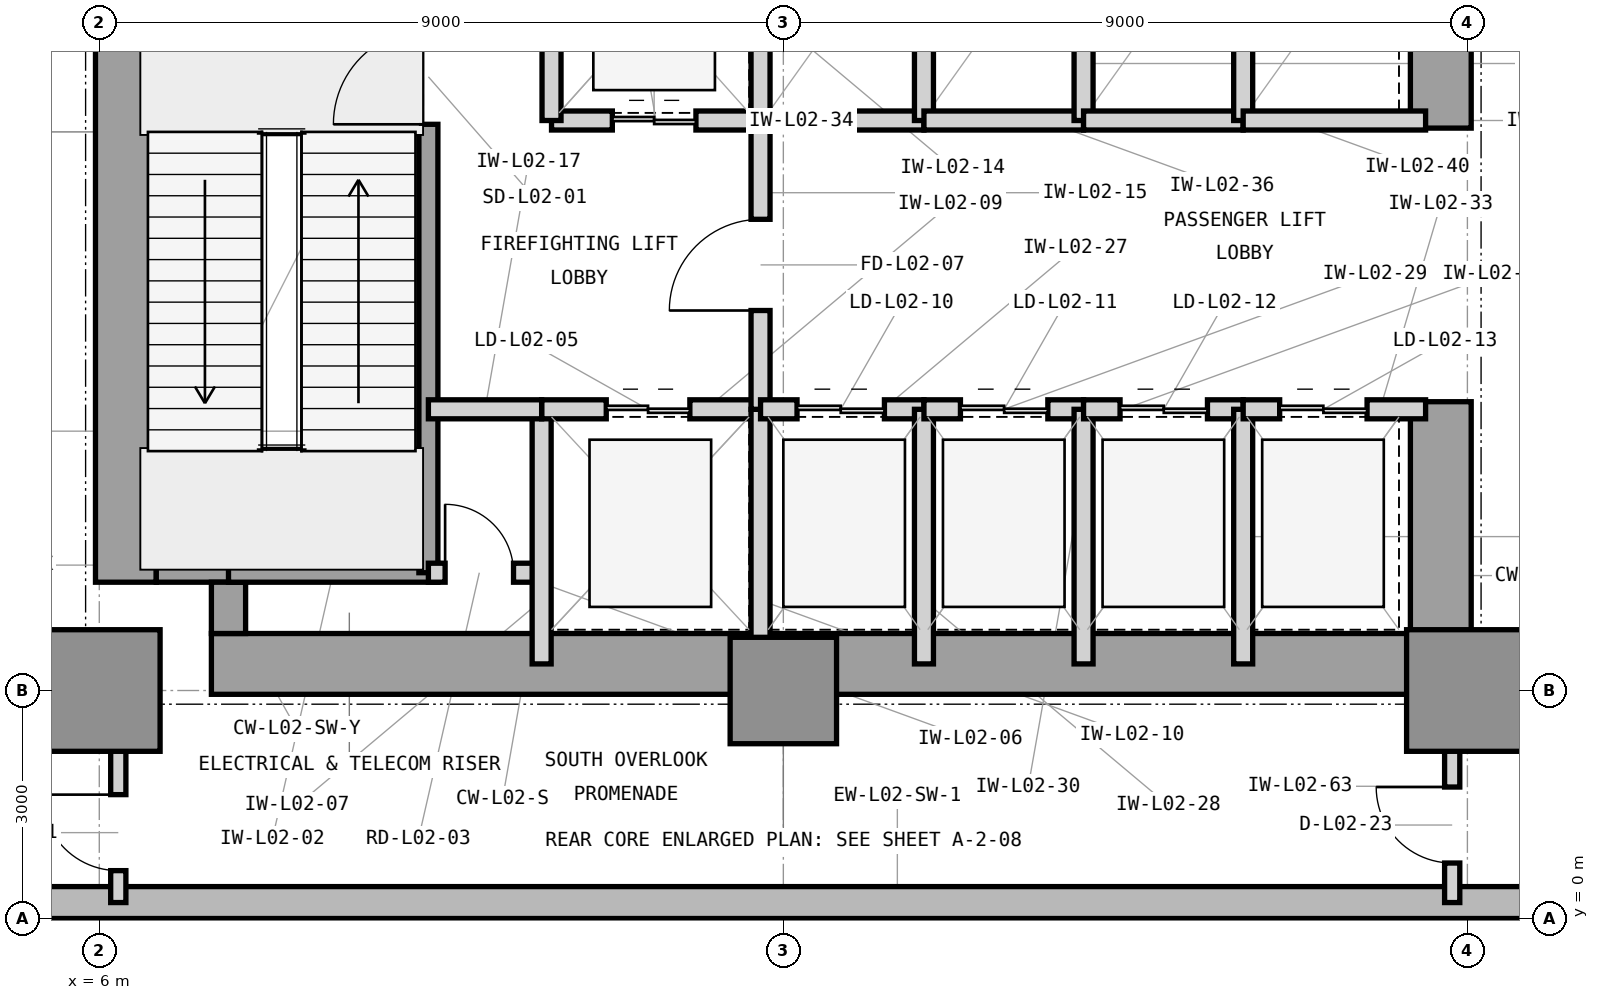
"""IFC4 building model, lengths in metres.
Left out: names, types, materials, properties, quantities, classifications, styles, units other than length and angle.
Written with IfcOpenShell. Run it as: python <this file> out.ifc"""

import sys

from ifc_helpers import new_model, si_unit, direction, frame, frame_2d, origin, origin_2d, place, context, subcontext, project, spatial, rectangle, extrude, element, fill, save


model = new_model("IFC4")
c1 = context("Model", 3, precision=1e-05, world=origin(), true_north=direction((0.0, 1.0)))
c2 = subcontext(c1, "Body", "Model", "MODEL_VIEW")
j1 = project(units=[si_unit("LENGTHUNIT", "METRE"), si_unit("PLANEANGLEUNIT", "RADIAN")], contexts=[c1])
p1 = place(None, origin())
s1 = spatial("IfcSite", under=j1, at=p1, CompositionType="ELEMENT")
p2 = place(p1, origin())
s2 = spatial("IfcBuilding", under=s1, at=p2, CompositionType="ELEMENT")
p3 = place(p2, frame((0.0, 0.0, 10.8)))
s3 = spatial("IfcBuildingStorey", under=s2, at=p3, CompositionType="ELEMENT", Elevation=10.8)
p4 = place(p3, frame((7.475, 3.35, 0.0), z_axis=(0.0, 0.0, 1.0), x_axis=(1.0, 0.0, 0.0)))
e1 = element("IfcWall", 1, at=p4, inside=s3, PredefinedType="SHEAR", context=c2, shape_type="SweptSolid", body=[
    extrude(rectangle(XDim=16.575, YDim=0.8, at=frame_2d((8.288, 0.0))), origin(), (0.0, 0.0, 1.0), 5.4),
])
p5 = place(p3, frame((6.35, 4.425, 0.0), z_axis=(0.0, 0.0, 1.0), x_axis=(0.0, 1.0, 0.0)))
e2 = element("IfcWall", 2, at=p5, inside=s3, PredefinedType="SHEAR", context=c2, shape_type="SweptSolid", body=[
    extrude(rectangle(XDim=15.15, YDim=0.8, at=frame_2d((7.575, 0.0))), origin(), (0.0, 0.0, 1.0), 5.4),
])
p6 = place(p3, frame((23.65, 3.75, 0.0), z_axis=(0.0, 0.0, 1.0), x_axis=(0.0, 1.0, 0.0)))
e3 = element("IfcWall", 3, at=p6, inside=s3, PredefinedType="SHEAR", context=c2, shape_type="SweptSolid", body=[
    extrude(rectangle(XDim=3.05, YDim=0.8, at=frame_2d((1.525, 0.0))), origin(), (0.0, 0.0, 1.0), 5.4),
])
p7 = place(p3, frame((23.65, 10.4, 0.0), z_axis=(0.0, 0.0, 1.0), x_axis=(0.0, 1.0, 0.0)))
e4 = element("IfcWall", 4, at=p7, inside=s3, PredefinedType="SHEAR", context=c2, shape_type="SweptSolid", body=[
    extrude(rectangle(XDim=3.2, YDim=0.8, at=frame_2d((1.6, 0.0))), origin(), (0.0, 0.0, 1.0), 5.4),
])
p8 = place(p3, frame((6.75, 4.65, 0.0), z_axis=(0.0, 0.0, 1.0), x_axis=(1.0, 0.0, 0.0)))
e5 = element("IfcWall", 5, at=p8, inside=s3, PredefinedType="SHEAR", context=c2, shape_type="SweptSolid", body=[
    extrude(rectangle(XDim=1.175, YDim=0.45, at=frame_2d((0.587, 0.0))), origin(), (0.0, 0.0, 1.0), 5.4),
])
p9 = place(p3, frame((7.7, 3.75, 0.0), z_axis=(0.0, 0.0, 1.0), x_axis=(0.0, 1.0, 0.0)))
e6 = element("IfcWall", 6, at=p9, inside=s3, PredefinedType="SHEAR", context=c2, shape_type="SweptSolid", body=[
    extrude(rectangle(XDim=0.675, YDim=0.45, at=frame_2d((0.337, 0.0))), origin(), (0.0, 0.0, 1.0), 5.4),
])
p10 = place(p3, frame((6.0, 3.0, 0.0), z_axis=(0.0, 0.0, 1.0), x_axis=(1.0, 0.0, 0.0)))
e7 = element("IfcColumn", 7, at=p10, inside=s3, PredefinedType="COLUMN", context=c2, shape_type="SweptSolid", body=[
    extrude(rectangle(XDim=1.6, YDim=1.6, at=origin_2d()), origin(), (0.0, 0.0, 1.0), 4.8),
])
p11 = place(p3, frame((15.0, 3.0, 0.0), z_axis=(0.0, 0.0, 1.0), x_axis=(1.0, 0.0, 0.0)))
e8 = element("IfcColumn", 8, at=p11, inside=s3, PredefinedType="COLUMN", context=c2, shape_type="SweptSolid", body=[
    extrude(rectangle(XDim=1.4, YDim=1.4, at=origin_2d()), origin(), (0.0, 0.0, 1.0), 4.8),
])
p12 = place(p3, frame((24.0, 3.0, 0.0), z_axis=(0.0, 0.0, 1.0), x_axis=(1.0, 0.0, 0.0)))
e9 = element("IfcColumn", 9, at=p12, inside=s3, PredefinedType="COLUMN", context=c2, shape_type="SweptSolid", body=[
    extrude(rectangle(XDim=1.6, YDim=1.6, at=origin_2d()), origin(), (0.0, 0.0, 1.0), 4.8),
])
p13 = place(p3, frame((0.0, 0.21, 0.0), z_axis=(0.0, 0.0, 1.0), x_axis=(1.0, 0.0, 0.0)))
e10 = element("IfcWall", 10, at=p13, inside=s3, PredefinedType="STANDARD", context=c2, shape_type="SweptSolid", body=[
    extrude(rectangle(XDim=33.0, YDim=0.42, at=frame_2d((16.5, 0.0))), origin(), (0.0, 0.0, 1.0), 4.8),
])
p14 = place(p3, frame((7.7, 4.55, 0.0), z_axis=(0.0, 0.0, 1.0), x_axis=(1.0, 0.0, 0.0)))
e11 = element("IfcWall", 11, at=p14, inside=s3, PredefinedType="SHEAR", context=c2, shape_type="SweptSolid", body=[
    extrude(rectangle(XDim=2.755, YDim=0.25, at=frame_2d((1.377, 0.0))), origin(), (0.0, 0.0, 1.0), 5.4),
])
p15 = place(p3, frame((10.33, 4.55, 0.0), z_axis=(0.0, 0.0, 1.0), x_axis=(0.0, 1.0, 0.0)))
e12 = element("IfcWall", 12, at=p15, inside=s3, PredefinedType="SHEAR", context=c2, shape_type="SweptSolid", body=[
    extrude(rectangle(XDim=7.45, YDim=0.25, at=frame_2d((3.725, 0.0))), origin(), (0.0, 0.0, 1.0), 5.4),
])
p16 = place(p15, frame((5.9, 0.0, 0.0)))
e13 = element("IfcOpeningElement", 13, at=p16, cuts=e12, PredefinedType="OPENING", context=c2, shape_type="SweptSolid", body=[
    extrude(rectangle(XDim=1.25, YDim=2.2, at=frame_2d((0.625, 1.1))), frame((0.0, 0.135, 0.0), z_axis=(0.0, -1.0, 0.0), x_axis=(1.0, 0.0, 0.0)), (0.0, 0.0, 1.0), 0.27),
])
p17 = place(p3, frame((10.33, 4.55, 0.0), z_axis=(0.0, 0.0, 1.0), x_axis=(1.0, 0.0, 0.0)))
e14 = element("IfcWall", 14, at=p17, inside=s3, PredefinedType="PARTITIONING", context=c2, shape_type="SweptSolid", body=[
    extrude(rectangle(XDim=1.49, YDim=0.25, at=frame_2d((0.745, 0.0))), origin(), (0.0, 0.0, 1.0), 4.79),
])
p18 = place(p17, frame((0.22, 0.0, 0.0)))
e15 = element("IfcOpeningElement", 15, at=p18, cuts=e14, PredefinedType="OPENING", context=c2, shape_type="SweptSolid", body=[
    extrude(rectangle(XDim=0.9, YDim=2.1, at=frame_2d((0.45, 1.05))), frame((0.0, 0.135, 0.0), z_axis=(0.0, -1.0, 0.0), x_axis=(1.0, 0.0, 0.0)), (0.0, 0.0, 1.0), 0.27),
])
p19 = place(p3, frame((11.82, 3.35, 0.0), z_axis=(0.0, 0.0, 1.0), x_axis=(0.0, 1.0, 0.0)))
e16 = element("IfcWall", 16, at=p19, inside=s3, PredefinedType="PARTITIONING", context=c2, shape_type="SweptSolid", body=[
    extrude(rectangle(XDim=3.35, YDim=0.25, at=frame_2d((1.675, 0.0))), origin(), (0.0, 0.0, 1.0), 4.79),
])
p20 = place(p3, frame((11.82, 6.7, 0.0), z_axis=(0.0, 0.0, 1.0), x_axis=(1.0, 0.0, 0.0)))
e17 = element("IfcWall", 17, at=p20, inside=s3, PredefinedType="PARTITIONING", context=c2, shape_type="SweptSolid", body=[
    extrude(rectangle(XDim=2.88, YDim=0.25, at=frame_2d((1.44, 0.0))), origin(), (0.0, 0.0, 1.0), 4.173),
])
p21 = place(p20, frame((0.85, 0.0, 0.0)))
e18 = element("IfcOpeningElement", 18, at=p21, cuts=e17, PredefinedType="OPENING", context=c2, shape_type="SweptSolid", body=[
    extrude(rectangle(XDim=1.1, YDim=2.25, at=frame_2d((0.55, 1.125))), frame((0.0, 0.135, 0.0), z_axis=(0.0, -1.0, 0.0), x_axis=(1.0, 0.0, 0.0)), (0.0, 0.0, 1.0), 0.27),
])
p22 = place(p3, frame((14.7, 3.35, 0.0), z_axis=(0.0, 0.0, 1.0), x_axis=(0.0, 1.0, 0.0)))
e19 = element("IfcWall", 19, at=p22, inside=s3, PredefinedType="PARTITIONING", context=c2, shape_type="SweptSolid", body=[
    extrude(rectangle(XDim=3.35, YDim=0.25, at=frame_2d((1.675, 0.0))), origin(), (0.0, 0.0, 1.0), 4.79),
])
p23 = place(p3, frame((11.95, 10.5, 0.0), z_axis=(0.0, 0.0, 1.0), x_axis=(1.0, 0.0, 0.0)))
e20 = element("IfcWall", 20, at=p23, inside=s3, PredefinedType="PARTITIONING", context=c2, shape_type="SweptSolid", body=[
    extrude(rectangle(XDim=2.75, YDim=0.25, at=frame_2d((1.375, 0.0))), origin(), (0.0, 0.0, 1.0), 4.173),
])
p24 = place(p23, frame((0.8, 0.0, 0.0)))
e21 = element("IfcOpeningElement", 21, at=p24, cuts=e20, PredefinedType="OPENING", context=c2, shape_type="SweptSolid", body=[
    extrude(rectangle(XDim=1.1, YDim=2.25, at=frame_2d((0.55, 1.125))), frame((0.0, 0.135, 0.0), z_axis=(0.0, -1.0, 0.0), x_axis=(1.0, 0.0, 0.0)), (0.0, 0.0, 1.0), 0.27),
])
for number, where, z_axis, x_axis in (
    (22, (11.95, 10.5, 0.0), (0.0, 0.0, 1.0), (0.0, 1.0, 0.0)),
    (23, (14.7, 10.5, 0.0), (0.0, 0.0, 1.0), (0.0, 1.0, 0.0)),
):
    element("IfcWall", number, at=place(p3, frame(where, z_axis=z_axis, x_axis=x_axis)), inside=s3, PredefinedType="PARTITIONING", context=c2, shape_type="SweptSolid", body=[
        extrude(rectangle(XDim=3.0, YDim=0.25, at=frame_2d((1.5, 0.0))), origin(), (0.0, 0.0, 1.0), 4.79),
    ])
p25 = place(p3, frame((14.7, 6.7, 0.0), z_axis=(0.0, 0.0, 1.0), x_axis=(0.0, 1.0, 0.0)))
e24 = element("IfcWall", 24, at=p25, inside=s3, PredefinedType="PARTITIONING", context=c2, shape_type="SweptSolid", body=[
    extrude(rectangle(XDim=3.8, YDim=0.25, at=frame_2d((1.9, 0.0))), origin(), (0.0, 0.0, 1.0), 4.79),
])
p26 = place(p25, frame((1.3, 0.0, 0.0)))
e25 = element("IfcOpeningElement", 25, at=p26, cuts=e24, PredefinedType="OPENING", context=c2, shape_type="SweptSolid", body=[
    extrude(rectangle(XDim=1.2, YDim=2.2, at=frame_2d((0.6, 1.1))), frame((0.0, 0.135, 0.0), z_axis=(0.0, -1.0, 0.0), x_axis=(1.0, 0.0, 0.0)), (0.0, 0.0, 1.0), 0.27),
])
p27 = place(p3, frame((10.33, 6.7, 0.0), z_axis=(0.0, 0.0, 1.0), x_axis=(1.0, 0.0, 0.0)))
e26 = element("IfcWall", 26, at=p27, inside=s3, PredefinedType="PARTITIONING", context=c2, shape_type="SweptSolid", body=[
    extrude(rectangle(XDim=1.49, YDim=0.25, at=frame_2d((0.745, 0.0))), origin(), (0.0, 0.0, 1.0), 4.173),
])
p28 = place(p3, frame((14.7, 6.7, 0.0), z_axis=(0.0, 0.0, 1.0), x_axis=(1.0, 0.0, 0.0)))
e27 = element("IfcWall", 27, at=p28, inside=s3, PredefinedType="PARTITIONING", context=c2, shape_type="SweptSolid", body=[
    extrude(rectangle(XDim=2.15, YDim=0.25, at=frame_2d((1.075, 0.0))), origin(), (0.0, 0.0, 1.0), 4.173),
])
p29 = place(p28, frame((0.48, 0.0, 0.0)))
e28 = element("IfcOpeningElement", 28, at=p29, cuts=e27, PredefinedType="OPENING", context=c2, shape_type="SweptSolid", body=[
    extrude(rectangle(XDim=1.15, YDim=2.25, at=frame_2d((0.575, 1.125))), frame((0.0, 0.135, 0.0), z_axis=(0.0, -1.0, 0.0), x_axis=(1.0, 0.0, 0.0)), (0.0, 0.0, 1.0), 0.27),
])
p30 = place(p3, frame((16.85, 3.35, 0.0), z_axis=(0.0, 0.0, 1.0), x_axis=(0.0, 1.0, 0.0)))
e29 = element("IfcWall", 29, at=p30, inside=s3, PredefinedType="PARTITIONING", context=c2, shape_type="SweptSolid", body=[
    extrude(rectangle(XDim=3.35, YDim=0.25, at=frame_2d((1.675, 0.0))), origin(), (0.0, 0.0, 1.0), 4.79),
])
p31 = place(p3, frame((16.85, 6.7, 0.0), z_axis=(0.0, 0.0, 1.0), x_axis=(1.0, 0.0, 0.0)))
e30 = element("IfcWall", 30, at=p31, inside=s3, PredefinedType="PARTITIONING", context=c2, shape_type="SweptSolid", body=[
    extrude(rectangle(XDim=2.1, YDim=0.25, at=frame_2d((1.05, 0.0))), origin(), (0.0, 0.0, 1.0), 4.173),
])
p32 = place(p31, frame((0.48, 0.0, 0.0)))
e31 = element("IfcOpeningElement", 31, at=p32, cuts=e30, PredefinedType="OPENING", context=c2, shape_type="SweptSolid", body=[
    extrude(rectangle(XDim=1.15, YDim=2.25, at=frame_2d((0.575, 1.125))), frame((0.0, 0.135, 0.0), z_axis=(0.0, -1.0, 0.0), x_axis=(1.0, 0.0, 0.0)), (0.0, 0.0, 1.0), 0.27),
])
p33 = place(p3, frame((18.95, 3.35, 0.0), z_axis=(0.0, 0.0, 1.0), x_axis=(0.0, 1.0, 0.0)))
e32 = element("IfcWall", 32, at=p33, inside=s3, PredefinedType="PARTITIONING", context=c2, shape_type="SweptSolid", body=[
    extrude(rectangle(XDim=3.35, YDim=0.25, at=frame_2d((1.675, 0.0))), origin(), (0.0, 0.0, 1.0), 4.79),
])
p34 = place(p3, frame((18.95, 6.7, 0.0), z_axis=(0.0, 0.0, 1.0), x_axis=(1.0, 0.0, 0.0)))
e33 = element("IfcWall", 33, at=p34, inside=s3, PredefinedType="PARTITIONING", context=c2, shape_type="SweptSolid", body=[
    extrude(rectangle(XDim=2.1, YDim=0.25, at=frame_2d((1.05, 0.0))), origin(), (0.0, 0.0, 1.0), 4.173),
])
p35 = place(p34, frame((0.48, 0.0, 0.0)))
e34 = element("IfcOpeningElement", 34, at=p35, cuts=e33, PredefinedType="OPENING", context=c2, shape_type="SweptSolid", body=[
    extrude(rectangle(XDim=1.15, YDim=2.25, at=frame_2d((0.575, 1.125))), frame((0.0, 0.135, 0.0), z_axis=(0.0, -1.0, 0.0), x_axis=(1.0, 0.0, 0.0)), (0.0, 0.0, 1.0), 0.27),
])
p36 = place(p3, frame((21.05, 3.35, 0.0), z_axis=(0.0, 0.0, 1.0), x_axis=(0.0, 1.0, 0.0)))
e35 = element("IfcWall", 35, at=p36, inside=s3, PredefinedType="PARTITIONING", context=c2, shape_type="SweptSolid", body=[
    extrude(rectangle(XDim=3.35, YDim=0.25, at=frame_2d((1.675, 0.0))), origin(), (0.0, 0.0, 1.0), 4.79),
])
p37 = place(p3, frame((21.05, 6.7, 0.0), z_axis=(0.0, 0.0, 1.0), x_axis=(1.0, 0.0, 0.0)))
e36 = element("IfcWall", 36, at=p37, inside=s3, PredefinedType="PARTITIONING", context=c2, shape_type="SweptSolid", body=[
    extrude(rectangle(XDim=2.4, YDim=0.25, at=frame_2d((1.2, 0.0))), origin(), (0.0, 0.0, 1.0), 4.173),
])
p38 = place(p37, frame((0.48, 0.0, 0.0)))
e37 = element("IfcOpeningElement", 37, at=p38, cuts=e36, PredefinedType="OPENING", context=c2, shape_type="SweptSolid", body=[
    extrude(rectangle(XDim=1.15, YDim=2.25, at=frame_2d((0.575, 1.125))), frame((0.0, 0.135, 0.0), z_axis=(0.0, -1.0, 0.0), x_axis=(1.0, 0.0, 0.0)), (0.0, 0.0, 1.0), 0.27),
])
p39 = place(p3, frame((14.7, 10.5, 0.0), z_axis=(0.0, 0.0, 1.0), x_axis=(1.0, 0.0, 0.0)))
e38 = element("IfcWall", 38, at=p39, inside=s3, PredefinedType="PARTITIONING", context=c2, shape_type="SweptSolid", body=[
    extrude(rectangle(XDim=2.15, YDim=0.25, at=frame_2d((1.075, 0.0))), origin(), (0.0, 0.0, 1.0), 4.173),
])
p40 = place(p3, frame((16.85, 10.5, 0.0), z_axis=(0.0, 0.0, 1.0), x_axis=(0.0, 1.0, 0.0)))
e39 = element("IfcWall", 39, at=p40, inside=s3, PredefinedType="PARTITIONING", context=c2, shape_type="SweptSolid", body=[
    extrude(rectangle(XDim=3.0, YDim=0.25, at=frame_2d((1.5, 0.0))), origin(), (0.0, 0.0, 1.0), 4.79),
])
p41 = place(p3, frame((16.85, 10.5, 0.0), z_axis=(0.0, 0.0, 1.0), x_axis=(1.0, 0.0, 0.0)))
e40 = element("IfcWall", 40, at=p41, inside=s3, PredefinedType="PARTITIONING", context=c2, shape_type="SweptSolid", body=[
    extrude(rectangle(XDim=2.1, YDim=0.25, at=frame_2d((1.05, 0.0))), origin(), (0.0, 0.0, 1.0), 4.173),
])
p42 = place(p3, frame((18.95, 10.5, 0.0), z_axis=(0.0, 0.0, 1.0), x_axis=(0.0, 1.0, 0.0)))
e41 = element("IfcWall", 41, at=p42, inside=s3, PredefinedType="PARTITIONING", context=c2, shape_type="SweptSolid", body=[
    extrude(rectangle(XDim=3.0, YDim=0.25, at=frame_2d((1.5, 0.0))), origin(), (0.0, 0.0, 1.0), 4.79),
])
p43 = place(p3, frame((18.95, 10.5, 0.0), z_axis=(0.0, 0.0, 1.0), x_axis=(1.0, 0.0, 0.0)))
e42 = element("IfcWall", 42, at=p43, inside=s3, PredefinedType="PARTITIONING", context=c2, shape_type="SweptSolid", body=[
    extrude(rectangle(XDim=2.1, YDim=0.25, at=frame_2d((1.05, 0.0))), origin(), (0.0, 0.0, 1.0), 4.173),
])
p44 = place(p3, frame((21.05, 10.5, 0.0), z_axis=(0.0, 0.0, 1.0), x_axis=(0.0, 1.0, 0.0)))
e43 = element("IfcWall", 43, at=p44, inside=s3, PredefinedType="PARTITIONING", context=c2, shape_type="SweptSolid", body=[
    extrude(rectangle(XDim=3.0, YDim=0.25, at=frame_2d((1.5, 0.0))), origin(), (0.0, 0.0, 1.0), 4.79),
])
p45 = place(p3, frame((21.05, 10.5, 0.0), z_axis=(0.0, 0.0, 1.0), x_axis=(1.0, 0.0, 0.0)))
e44 = element("IfcWall", 44, at=p45, inside=s3, PredefinedType="PARTITIONING", context=c2, shape_type="SweptSolid", body=[
    extrude(rectangle(XDim=2.4, YDim=0.25, at=frame_2d((1.2, 0.0))), origin(), (0.0, 0.0, 1.0), 4.173),
])
p46 = place(p3, frame((6.25, 0.21, 0.0), z_axis=(0.0, 0.0, 1.0), x_axis=(0.0, 1.0, 0.0)))
e45 = element("IfcWall", 45, at=p46, inside=s3, PredefinedType="PARTITIONING", context=c2, shape_type="SweptSolid", body=[
    extrude(rectangle(XDim=3.14, YDim=0.2, at=frame_2d((1.57, 0.0))), origin(), (0.0, 0.0, 1.0), 4.79),
])
p47 = place(p46, frame((0.42, 0.0, 0.0)))
e46 = element("IfcOpeningElement", 46, at=p47, cuts=e45, PredefinedType="OPENING", context=c2, shape_type="SweptSolid", body=[
    extrude(rectangle(XDim=1.0, YDim=2.15, at=frame_2d((0.5, 1.075))), frame((0.0, 0.11, 0.0), z_axis=(0.0, -1.0, 0.0), x_axis=(1.0, 0.0, 0.0)), (0.0, 0.0, 1.0), 0.22),
])
p48 = place(p3, frame((23.8, 0.21, 0.0), z_axis=(0.0, 0.0, 1.0), x_axis=(0.0, 1.0, 0.0)))
e47 = element("IfcWall", 47, at=p48, inside=s3, PredefinedType="PARTITIONING", context=c2, shape_type="SweptSolid", body=[
    extrude(rectangle(XDim=2.04, YDim=0.2, at=frame_2d((1.02, 0.0))), origin(), (0.0, 0.0, 1.0), 4.79),
])
p49 = place(p48, frame((0.52, 0.0, 0.0)))
e48 = element("IfcOpeningElement", 48, at=p49, cuts=e47, PredefinedType="OPENING", context=c2, shape_type="SweptSolid", body=[
    extrude(rectangle(XDim=1.0, YDim=2.15, at=frame_2d((0.5, 1.075))), frame((0.0, 0.11, 0.0), z_axis=(0.0, -1.0, 0.0), x_axis=(1.0, 0.0, 0.0)), (0.0, 0.0, 1.0), 0.22),
])
p50 = place(p16, origin())
e49 = element("IfcDoor", 49, at=p50, inside=s3, OperationType="SINGLE_SWING_LEFT", PredefinedType="DOOR", context=c2, shape_type="SweptSolid", body=[
    extrude(rectangle(XDim=1.25, YDim=2.2, at=frame_2d((0.625, 1.1))), frame((0.0, 0.025, 0.0), z_axis=(0.0, -1.0, 0.0), x_axis=(1.0, 0.0, 0.0)), (0.0, 0.0, 1.0), 0.05),
])
fill(e13, e49)
p51 = place(p18, origin())
e50 = element("IfcDoor", 50, at=p51, inside=s3, OperationType="SINGLE_SWING_LEFT", PredefinedType="TRAPDOOR", context=c2, shape_type="SweptSolid", body=[
    extrude(rectangle(XDim=0.9, YDim=2.1, at=frame_2d((0.45, 1.05))), frame((0.0, 0.025, 0.0), z_axis=(0.0, -1.0, 0.0), x_axis=(1.0, 0.0, 0.0)), (0.0, 0.0, 1.0), 0.05),
])
fill(e15, e50)
p52 = place(p21, origin())
e51 = element("IfcDoor", 51, at=p52, inside=s3, OperationType="DOUBLE_DOOR_SLIDING", PredefinedType="DOOR", context=c2, shape_type="SweptSolid", body=[
    extrude(rectangle(XDim=1.1, YDim=2.25, at=frame_2d((0.55, 1.125))), frame((0.0, 0.025, 0.0), z_axis=(0.0, -1.0, 0.0), x_axis=(1.0, 0.0, 0.0)), (0.0, 0.0, 1.0), 0.05),
])
fill(e18, e51)
p53 = place(p24, origin())
e52 = element("IfcDoor", 52, at=p53, inside=s3, OperationType="DOUBLE_DOOR_SLIDING", PredefinedType="DOOR", context=c2, shape_type="SweptSolid", body=[
    extrude(rectangle(XDim=1.1, YDim=2.25, at=frame_2d((0.55, 1.125))), frame((0.0, 0.025, 0.0), z_axis=(0.0, -1.0, 0.0), x_axis=(1.0, 0.0, 0.0)), (0.0, 0.0, 1.0), 0.05),
])
fill(e21, e52)
p54 = place(p26, origin())
e53 = element("IfcDoor", 53, at=p54, inside=s3, OperationType="SINGLE_SWING_LEFT", PredefinedType="DOOR", context=c2, shape_type="SweptSolid", body=[
    extrude(rectangle(XDim=1.2, YDim=2.2, at=frame_2d((0.6, 1.1))), frame((0.0, 0.025, 0.0), z_axis=(0.0, -1.0, 0.0), x_axis=(1.0, 0.0, 0.0)), (0.0, 0.0, 1.0), 0.05),
])
fill(e25, e53)
p55 = place(p29, origin())
e54 = element("IfcDoor", 54, at=p55, inside=s3, OperationType="DOUBLE_DOOR_SLIDING", PredefinedType="DOOR", context=c2, shape_type="SweptSolid", body=[
    extrude(rectangle(XDim=1.15, YDim=2.25, at=frame_2d((0.575, 1.125))), frame((0.0, 0.025, 0.0), z_axis=(0.0, -1.0, 0.0), x_axis=(1.0, 0.0, 0.0)), (0.0, 0.0, 1.0), 0.05),
])
fill(e28, e54)
p56 = place(p32, origin())
e55 = element("IfcDoor", 55, at=p56, inside=s3, OperationType="DOUBLE_DOOR_SLIDING", PredefinedType="DOOR", context=c2, shape_type="SweptSolid", body=[
    extrude(rectangle(XDim=1.15, YDim=2.25, at=frame_2d((0.575, 1.125))), frame((0.0, 0.025, 0.0), z_axis=(0.0, -1.0, 0.0), x_axis=(1.0, 0.0, 0.0)), (0.0, 0.0, 1.0), 0.05),
])
fill(e31, e55)
p57 = place(p35, origin())
e56 = element("IfcDoor", 56, at=p57, inside=s3, OperationType="DOUBLE_DOOR_SLIDING", PredefinedType="DOOR", context=c2, shape_type="SweptSolid", body=[
    extrude(rectangle(XDim=1.15, YDim=2.25, at=frame_2d((0.575, 1.125))), frame((0.0, 0.025, 0.0), z_axis=(0.0, -1.0, 0.0), x_axis=(1.0, 0.0, 0.0)), (0.0, 0.0, 1.0), 0.05),
])
fill(e34, e56)
p58 = place(p38, origin())
e57 = element("IfcDoor", 57, at=p58, inside=s3, OperationType="DOUBLE_DOOR_SLIDING", PredefinedType="DOOR", context=c2, shape_type="SweptSolid", body=[
    extrude(rectangle(XDim=1.15, YDim=2.25, at=frame_2d((0.575, 1.125))), frame((0.0, 0.025, 0.0), z_axis=(0.0, -1.0, 0.0), x_axis=(1.0, 0.0, 0.0)), (0.0, 0.0, 1.0), 0.05),
])
fill(e37, e57)
p59 = place(p47, origin())
e58 = element("IfcDoor", 58, at=p59, inside=s3, OperationType="SINGLE_SWING_RIGHT", PredefinedType="DOOR", context=c2, shape_type="SweptSolid", body=[
    extrude(rectangle(XDim=1.0, YDim=2.15, at=frame_2d((0.5, 1.075))), frame((0.0, 0.025, 0.0), z_axis=(0.0, -1.0, 0.0), x_axis=(1.0, 0.0, 0.0)), (0.0, 0.0, 1.0), 0.05),
])
fill(e46, e58)
p60 = place(p49, origin())
e59 = element("IfcDoor", 59, at=p60, inside=s3, OperationType="SINGLE_SWING_RIGHT", PredefinedType="DOOR", context=c2, shape_type="SweptSolid", body=[
    extrude(rectangle(XDim=1.0, YDim=2.15, at=frame_2d((0.5, 1.075))), frame((0.0, 0.025, 0.0), z_axis=(0.0, -1.0, 0.0), x_axis=(1.0, 0.0, 0.0)), (0.0, 0.0, 1.0), 0.05),
])
fill(e48, e59)
save(model, sys.argv[1])
